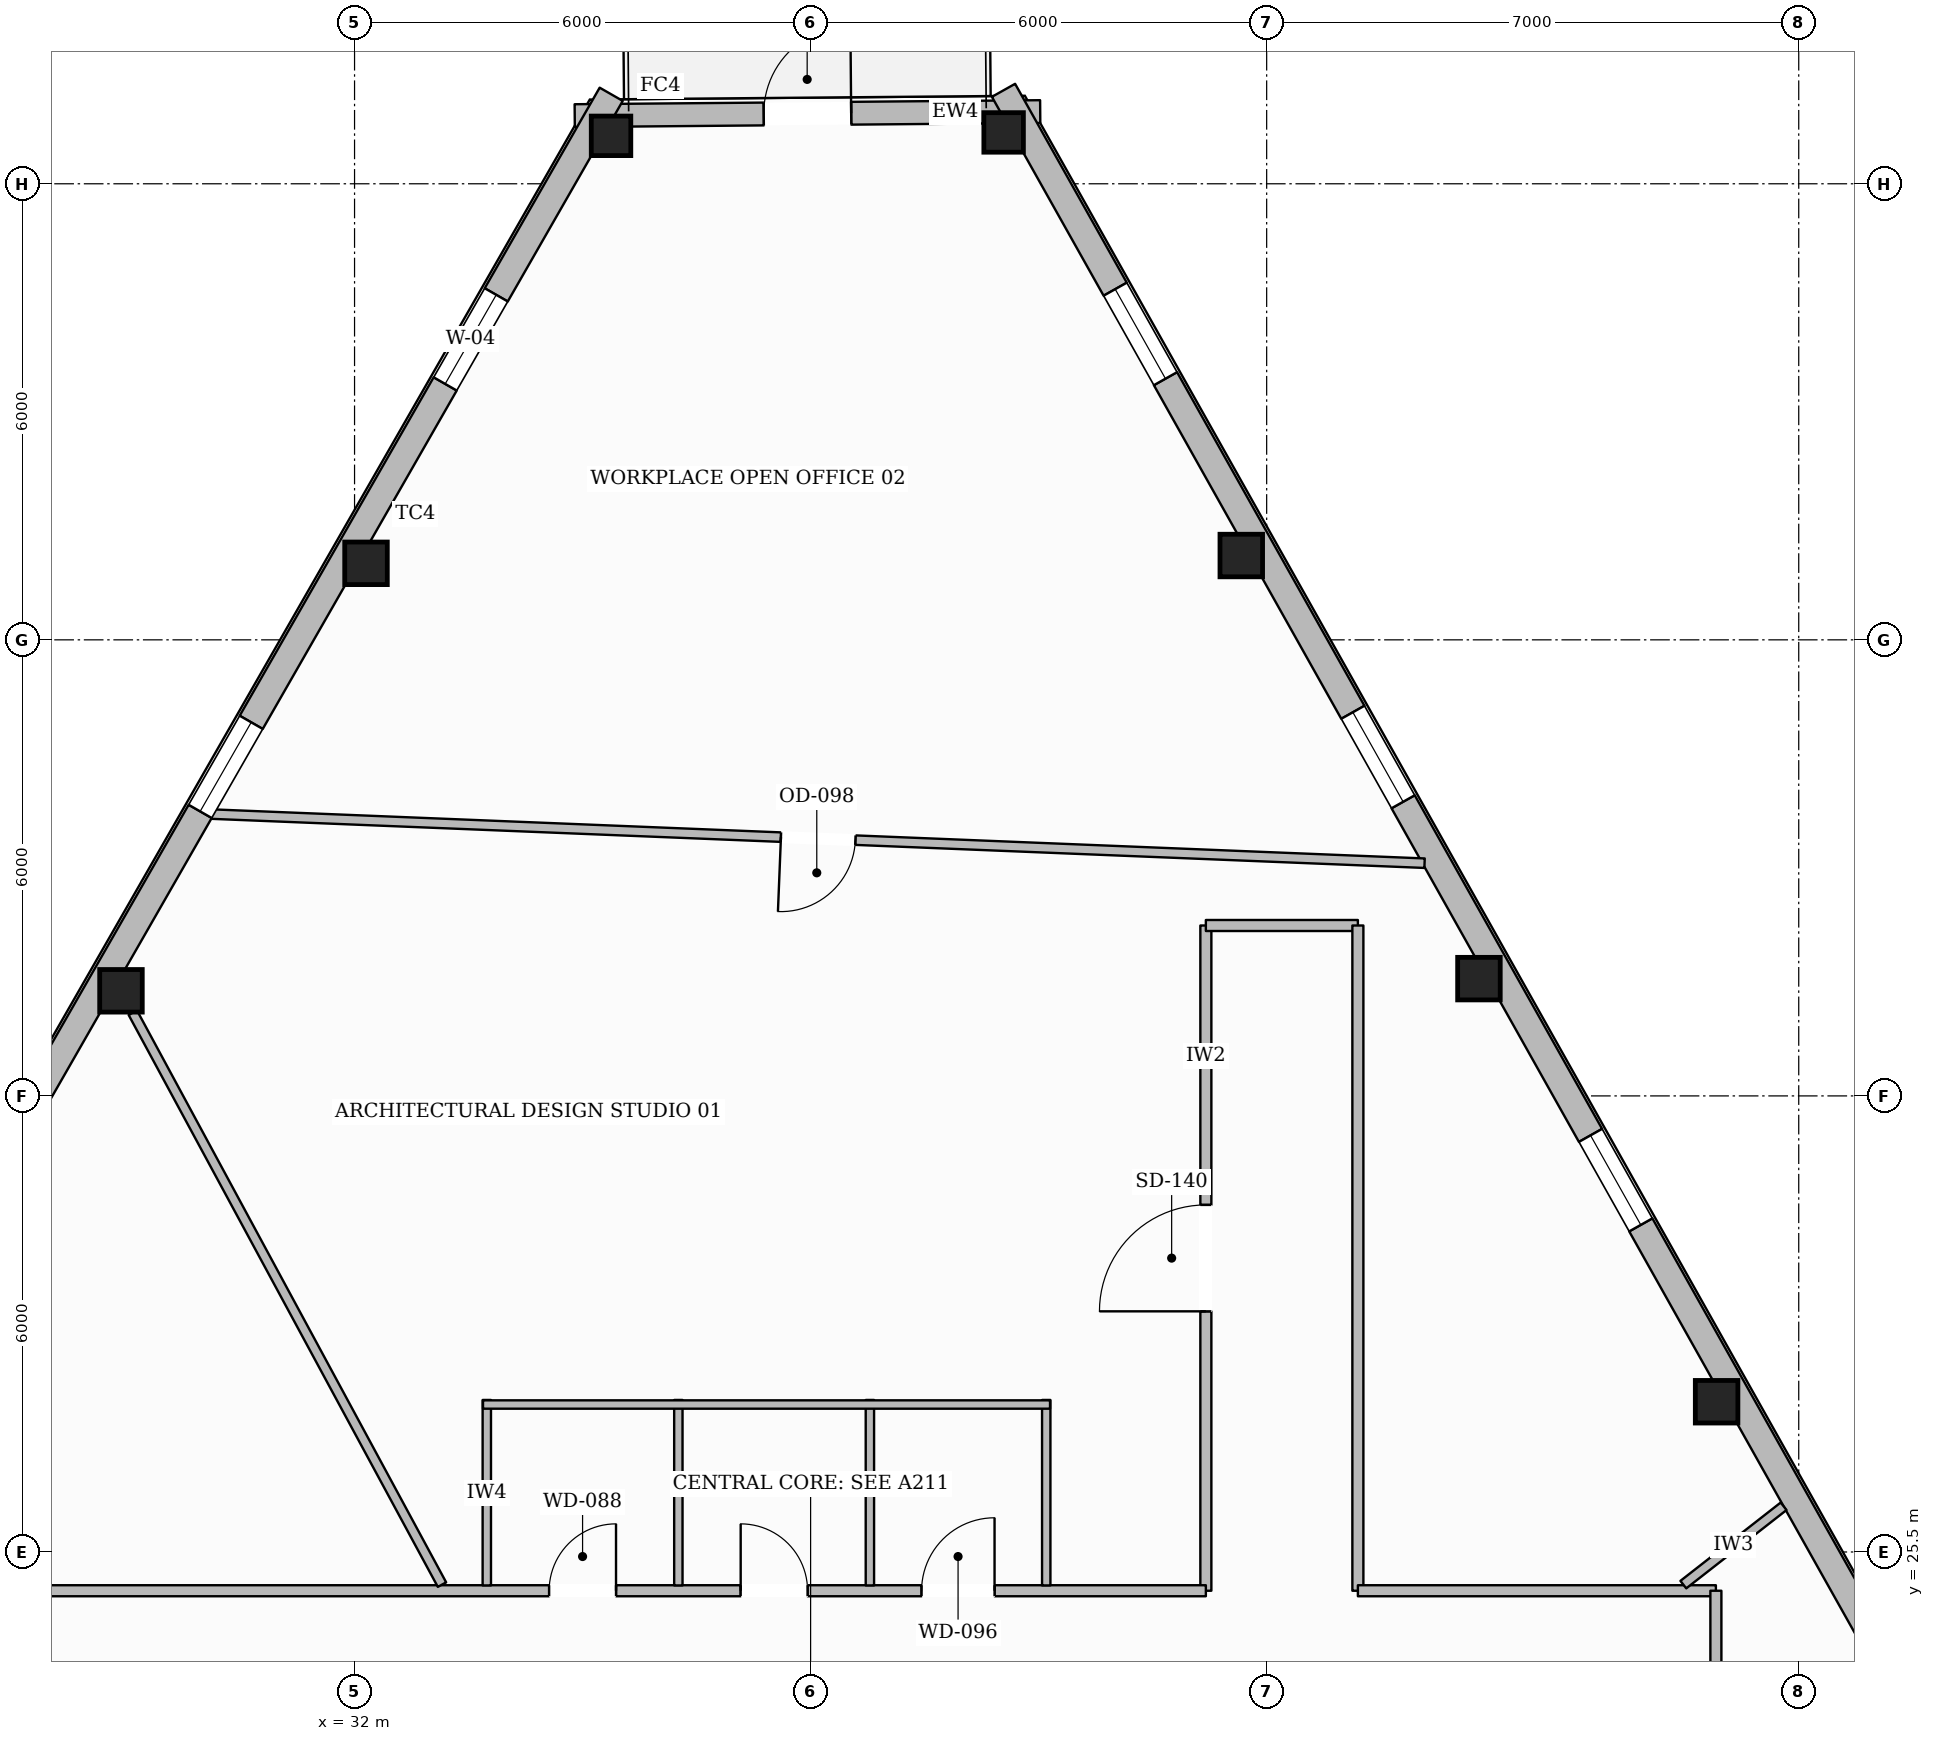
"""IFC4 building model, lengths in metres.
Left out: names, types, materials, properties, quantities, classifications, styles, units other than length and angle.
Written with IfcOpenShell. Run it as: python <this file> out.ifc"""

import sys

from ifc_helpers import new_model, si_unit, direction, frame, frame_2d, origin, origin_2d, place, context, subcontext, project, spatial, rectangle, hollow_rectangle, extrude, element, fill, save


model = new_model("IFC4")
c1 = context("Model", 3, precision=1e-05, world=origin(), true_north=direction((0.0, 1.0)))
c2 = subcontext(c1, "Body", "Model", "MODEL_VIEW")
j1 = project(units=[si_unit("LENGTHUNIT", "METRE"), si_unit("PLANEANGLEUNIT", "RADIAN")], contexts=[c1])
p1 = place(None, origin())
s1 = spatial("IfcSite", under=j1, at=p1, CompositionType="ELEMENT")
p2 = place(p1, origin())
s2 = spatial("IfcBuilding", under=s1, at=p2, CompositionType="ELEMENT")
p3 = place(p2, frame((0.0, 0.0, 297.25)))
s3 = spatial("IfcBuildingStorey", under=s2, at=p3, CompositionType="ELEMENT", Elevation=297.25)
p4 = place(p3, frame((35.375, 44.131, 0.0), z_axis=(0.0, 0.0, 1.0), x_axis=(1.0, 0.0, 0.0)))
e1 = element("IfcColumn", 1, at=p4, inside=s3, PredefinedType="COLUMN", context=c2, shape_type="SweptSolid", body=[
    extrude(hollow_rectangle(XDim=0.52, YDim=0.52, WallThickness=0.024, at=origin_2d()), origin(), (0.0, 0.0, 1.0), 3.61),
])
for number, where, z_axis, x_axis in (
    (2, (32.151, 38.507, 0.0), (0.0, 0.0, 1.0), (1.0, 0.0, 0.0)),
    (3, (28.927, 32.883, 0.0), (0.0, 0.0, 1.0), (1.0, 0.0, 0.0)),
    (4, (49.919, 27.477, 0.0), (0.0, 0.0, 1.0), (1.0, 0.0, 0.0)),
    (5, (46.793, 33.043, 0.0), (0.0, 0.0, 1.0), (1.0, 0.0, 0.0)),
    (6, (43.666, 38.609, 0.0), (0.0, 0.0, 1.0), (1.0, 0.0, 0.0)),
):
    element("IfcColumn", number, at=place(p3, frame(where, z_axis=z_axis, x_axis=x_axis)), inside=s3, PredefinedType="COLUMN", context=c2, shape_type="SweptSolid", body=[
        extrude(hollow_rectangle(XDim=0.56, YDim=0.56, WallThickness=0.025, at=origin_2d()), origin(), (0.0, 0.0, 1.0), 3.61),
    ])
p5 = place(p3, frame((40.539, 44.176, 0.0), z_axis=(0.0, 0.0, 1.0), x_axis=(1.0, 0.0, 0.0)))
e7 = element("IfcColumn", 7, at=p5, inside=s3, PredefinedType="COLUMN", context=c2, shape_type="SweptSolid", body=[
    extrude(hollow_rectangle(XDim=0.52, YDim=0.52, WallThickness=0.024, at=origin_2d()), origin(), (0.0, 0.0, 1.0), 3.61),
])
p6 = place(p3, frame((34.897, 44.396, 0.0), z_axis=(0.0, 0.0, 1.0), x_axis=(0.999962237146, 0.008690470726, 0.0)))
e8 = element("IfcWall", 8, at=p6, inside=s3, PredefinedType="STANDARD", context=c2, shape_type="SweptSolid", body=[
    extrude(rectangle(XDim=6.124, YDim=0.3, at=frame_2d((3.062, 0.0))), origin(), (0.0, 0.0, 1.0), 3.196),
])
p7 = place(p6, frame((2.487, 0.0, 0.0)))
e9 = element("IfcOpeningElement", 9, at=p7, cuts=e8, PredefinedType="OPENING", context=c2, shape_type="SweptSolid", body=[
    extrude(rectangle(XDim=1.15, YDim=2.2, at=frame_2d((0.575, 1.1))), frame((0.0, 0.16, 0.0), z_axis=(0.0, -1.0, 0.0), x_axis=(1.0, 0.0, 0.0)), (0.0, 0.0, 1.0), 0.32),
])
p8 = place(p3, frame((15.563, 10.112, 0.0), z_axis=(0.0, 0.0, 1.0), x_axis=(0.4973006053, 0.867578300771, 0.0)))
e10 = element("IfcWall", 10, at=p8, inside=s3, PredefinedType="STANDARD", context=c2, shape_type="SweptSolid", body=[
    extrude(rectangle(XDim=39.842, YDim=0.35, at=frame_2d((19.921, 0.0))), origin(), (0.0, 0.0, 1.0), 3.196),
])
p9 = place(p8, frame((35.45, 0.0, 0.65)))
e11 = element("IfcOpeningElement", 11, at=p9, cuts=e10, PredefinedType="OPENING", context=c2, shape_type="SweptSolid", body=[
    extrude(rectangle(XDim=1.35, YDim=1.75, at=frame_2d((0.675, 0.875))), frame((0.0, 0.185, 0.0), z_axis=(0.0, -1.0, 0.0), x_axis=(1.0, 0.0, 0.0)), (0.0, 0.0, 1.0), 0.37),
])
p10 = place(p8, frame((28.968, 0.0, 0.65)))
e12 = element("IfcOpeningElement", 12, at=p10, cuts=e10, PredefinedType="OPENING", context=c2, shape_type="SweptSolid", body=[
    extrude(rectangle(XDim=1.35, YDim=1.75, at=frame_2d((0.675, 0.875))), frame((0.0, 0.185, 0.0), z_axis=(0.0, -1.0, 0.0), x_axis=(1.0, 0.0, 0.0)), (0.0, 0.0, 1.0), 0.37),
])
p11 = place(p8, frame((16.003, 0.0, 0.65)))
e13 = element("IfcOpeningElement", 13, at=p11, cuts=e10, PredefinedType="OPENING", context=c2, shape_type="SweptSolid", body=[
    extrude(rectangle(XDim=1.35, YDim=1.75, at=frame_2d((0.675, 0.875))), frame((0.0, 0.185, 0.0), z_axis=(0.0, -1.0, 0.0), x_axis=(1.0, 0.0, 0.0)), (0.0, 0.0, 1.0), 0.37),
])
p12 = place(p8, frame((9.521, 0.0, 0.65)))
e14 = element("IfcOpeningElement", 14, at=p12, cuts=e10, PredefinedType="OPENING", context=c2, shape_type="SweptSolid", body=[
    extrude(rectangle(XDim=1.35, YDim=1.75, at=frame_2d((0.675, 0.875))), frame((0.0, 0.185, 0.0), z_axis=(0.0, -1.0, 0.0), x_axis=(1.0, 0.0, 0.0)), (0.0, 0.0, 1.0), 0.37),
])
p13 = place(p8, frame((3.039, 0.0, 0.65)))
e15 = element("IfcOpeningElement", 15, at=p13, cuts=e10, PredefinedType="OPENING", context=c2, shape_type="SweptSolid", body=[
    extrude(rectangle(XDim=1.35, YDim=1.75, at=frame_2d((0.675, 0.875))), frame((0.0, 0.185, 0.0), z_axis=(0.0, -1.0, 0.0), x_axis=(1.0, 0.0, 0.0)), (0.0, 0.0, 1.0), 0.37),
])
p14 = place(p3, frame((40.538, 44.729, 0.0), z_axis=(0.0, 0.0, 1.0), x_axis=(0.48974037202, -0.871868320341, 0.0)))
e16 = element("IfcWall", 16, at=p14, inside=s3, PredefinedType="STANDARD", context=c2, shape_type="SweptSolid", body=[
    extrude(rectangle(XDim=39.262, YDim=0.35, at=frame_2d((19.631, 0.0))), origin(), (0.0, 0.0, 1.0), 3.196),
])
p15 = place(p14, frame((34.923, 0.0, 0.65)))
e17 = element("IfcOpeningElement", 17, at=p15, cuts=e16, PredefinedType="OPENING", context=c2, shape_type="SweptSolid", body=[
    extrude(rectangle(XDim=1.35, YDim=1.75, at=frame_2d((0.675, 0.875))), frame((0.0, 0.185, 0.0), z_axis=(0.0, -1.0, 0.0), x_axis=(1.0, 0.0, 0.0)), (0.0, 0.0, 1.0), 0.37),
])
p16 = place(p14, frame((28.538, 0.0, 0.65)))
e18 = element("IfcOpeningElement", 18, at=p16, cuts=e16, PredefinedType="OPENING", context=c2, shape_type="SweptSolid", body=[
    extrude(rectangle(XDim=1.35, YDim=1.75, at=frame_2d((0.675, 0.875))), frame((0.0, 0.185, 0.0), z_axis=(0.0, -1.0, 0.0), x_axis=(1.0, 0.0, 0.0)), (0.0, 0.0, 1.0), 0.37),
])
p17 = place(p14, frame((15.77, 0.0, 0.65)))
e19 = element("IfcOpeningElement", 19, at=p17, cuts=e16, PredefinedType="OPENING", context=c2, shape_type="SweptSolid", body=[
    extrude(rectangle(XDim=1.35, YDim=1.75, at=frame_2d((0.675, 0.875))), frame((0.0, 0.185, 0.0), z_axis=(0.0, -1.0, 0.0), x_axis=(1.0, 0.0, 0.0)), (0.0, 0.0, 1.0), 0.37),
])
p18 = place(p14, frame((9.385, 0.0, 0.65)))
e20 = element("IfcOpeningElement", 20, at=p18, cuts=e16, PredefinedType="OPENING", context=c2, shape_type="SweptSolid", body=[
    extrude(rectangle(XDim=1.35, YDim=1.75, at=frame_2d((0.675, 0.875))), frame((0.0, 0.185, 0.0), z_axis=(0.0, -1.0, 0.0), x_axis=(1.0, 0.0, 0.0)), (0.0, 0.0, 1.0), 0.37),
])
p19 = place(p14, frame((3.001, 0.0, 0.65)))
e21 = element("IfcOpeningElement", 21, at=p19, cuts=e16, PredefinedType="OPENING", context=c2, shape_type="SweptSolid", body=[
    extrude(rectangle(XDim=1.35, YDim=1.75, at=frame_2d((0.675, 0.875))), frame((0.0, 0.185, 0.0), z_axis=(0.0, -1.0, 0.0), x_axis=(1.0, 0.0, 0.0)), (0.0, 0.0, 1.0), 0.37),
])
p20 = place(p3, frame((43.2, 24.99, 0.0), z_axis=(0.0, 0.0, 1.0), x_axis=(0.0, 1.0, 0.0)))
e22 = element("IfcWall", 22, at=p20, inside=s3, PredefinedType="PARTITIONING", context=c2, shape_type="SweptSolid", body=[
    extrude(rectangle(XDim=8.752, YDim=0.145, at=frame_2d((4.376, 0.0))), origin(), (0.0, 0.0, 1.0), 3.61),
])
p21 = place(p20, frame((3.676, 0.0, 0.0)))
e23 = element("IfcOpeningElement", 23, at=p21, cuts=e22, PredefinedType="OPENING", context=c2, shape_type="SweptSolid", body=[
    extrude(rectangle(XDim=1.4, YDim=2.2, at=frame_2d((0.7, 1.1))), frame((0.0, 0.083, 0.0), z_axis=(0.0, -1.0, 0.0), x_axis=(1.0, 0.0, 0.0)), (0.0, 0.0, 1.0), 0.165),
])
p22 = place(p3, frame((43.2, 33.742, 0.0), z_axis=(0.0, 0.0, 1.0), x_axis=(1.0, 0.0, 0.0)))
e24 = element("IfcWall", 24, at=p22, inside=s3, PredefinedType="PARTITIONING", context=c2, shape_type="SweptSolid", body=[
    extrude(rectangle(XDim=2.0, YDim=0.145, at=frame_2d((1.0, 0.0))), origin(), (0.0, 0.0, 1.0), 3.61),
])
p23 = place(p3, frame((45.2, 33.742, 0.0), z_axis=(0.0, 0.0, 1.0), x_axis=(0.0, -1.0, 0.0)))
e25 = element("IfcWall", 25, at=p23, inside=s3, PredefinedType="PARTITIONING", context=c2, shape_type="SweptSolid", body=[
    extrude(rectangle(XDim=8.752, YDim=0.145, at=frame_2d((4.376, 0.0))), origin(), (0.0, 0.0, 1.0), 3.61),
])
p24 = place(p3, frame((45.2, 24.99, 0.0), z_axis=(0.0, 0.0, 1.0), x_axis=(1.0, 0.0, 0.0)))
e26 = element("IfcWall", 26, at=p24, inside=s3, PredefinedType="PARTITIONING", context=c2, shape_type="SweptSolid", body=[
    extrude(rectangle(XDim=4.71, YDim=0.145, at=frame_2d((2.355, 0.0))), origin(), (0.0, 0.0, 1.0), 3.61),
])
p25 = place(p3, frame((49.91, 24.99, 0.0), z_axis=(0.0, 0.0, 1.0), x_axis=(0.0, -1.0, 0.0)))
e27 = element("IfcWall", 27, at=p25, inside=s3, PredefinedType="PARTITIONING", context=c2, shape_type="SweptSolid", body=[
    extrude(rectangle(XDim=7.34, YDim=0.145, at=frame_2d((3.67, 0.0))), origin(), (0.0, 0.0, 1.0), 3.349),
])
p26 = place(p3, frame((26.09, 24.99, 0.0), z_axis=(0.0, 0.0, 1.0), x_axis=(1.0, 0.0, 0.0)))
e28 = element("IfcWall", 28, at=p26, inside=s3, PredefinedType="PARTITIONING", context=c2, shape_type="SweptSolid", body=[
    extrude(rectangle(XDim=17.11, YDim=0.145, at=frame_2d((8.555, 0.0))), origin(), (0.0, 0.0, 1.0), 3.61),
])
p27 = place(p26, frame((8.47, 0.0, 0.0)))
e29 = element("IfcOpeningElement", 29, at=p27, cuts=e28, PredefinedType="OPENING", context=c2, shape_type="SweptSolid", body=[
    extrude(rectangle(XDim=0.88, YDim=2.1, at=frame_2d((0.44, 1.05))), frame((0.0, 0.083, 0.0), z_axis=(0.0, -1.0, 0.0), x_axis=(1.0, 0.0, 0.0)), (0.0, 0.0, 1.0), 0.165),
])
p28 = place(p26, frame((10.99, 0.0, 0.0)))
e30 = element("IfcOpeningElement", 30, at=p28, cuts=e28, PredefinedType="OPENING", context=c2, shape_type="SweptSolid", body=[
    extrude(rectangle(XDim=0.88, YDim=2.1, at=frame_2d((0.44, 1.05))), frame((0.0, 0.083, 0.0), z_axis=(0.0, -1.0, 0.0), x_axis=(1.0, 0.0, 0.0)), (0.0, 0.0, 1.0), 0.165),
])
p29 = place(p26, frame((13.37, 0.0, 0.0)))
e31 = element("IfcOpeningElement", 31, at=p29, cuts=e28, PredefinedType="OPENING", context=c2, shape_type="SweptSolid", body=[
    extrude(rectangle(XDim=0.96, YDim=2.1, at=frame_2d((0.48, 1.05))), frame((0.0, 0.083, 0.0), z_axis=(0.0, -1.0, 0.0), x_axis=(1.0, 0.0, 0.0)), (0.0, 0.0, 1.0), 0.165),
])
for number, where, z_axis, x_axis in (
    (32, (33.74, 25.06, 0.0), (0.0, 0.0, 1.0), (0.0, 1.0, 0.0)),
    (33, (36.26, 25.06, 0.0), (0.0, 0.0, 1.0), (0.0, 1.0, 0.0)),
    (34, (38.78, 25.06, 0.0), (0.0, 0.0, 1.0), (0.0, 1.0, 0.0)),
    (35, (41.1, 25.06, 0.0), (0.0, 0.0, 1.0), (0.0, 1.0, 0.0)),
):
    element("IfcWall", number, at=place(p3, frame(where, z_axis=z_axis, x_axis=x_axis)), inside=s3, PredefinedType="PLUMBINGWALL", context=c2, shape_type="SweptSolid", body=[
        extrude(rectangle(XDim=2.44, YDim=0.11, at=frame_2d((1.22, 0.0))), origin(), (0.0, 0.0, 1.0), 3.61),
    ])
p30 = place(p3, frame((33.69, 27.44, 0.0), z_axis=(0.0, 0.0, 1.0), x_axis=(1.0, 0.0, 0.0)))
e36 = element("IfcWall", 36, at=p30, inside=s3, PredefinedType="PLUMBINGWALL", context=c2, shape_type="SweptSolid", body=[
    extrude(rectangle(XDim=7.46, YDim=0.11, at=frame_2d((3.73, 0.0))), origin(), (0.0, 0.0, 1.0), 3.61),
])
p31 = place(p3, frame((49.482, 25.071, 0.0), z_axis=(0.0, 0.0, 1.0), x_axis=(0.788031007274, 0.615635550935, 0.0)))
e37 = element("IfcWall", 37, at=p31, inside=s3, PredefinedType="PARTITIONING", context=c2, shape_type="SweptSolid", body=[
    extrude(rectangle(XDim=1.674, YDim=0.125, at=frame_2d((0.837, 0.0))), origin(), (0.0, 0.0, 1.0), 3.61),
])
p32 = place(p3, frame((33.15, 25.071, 0.0), z_axis=(0.0, 0.0, 1.0), x_axis=(-0.47556300341, 0.879681663892, 0.0)))
e38 = element("IfcWall", 38, at=p32, inside=s3, PredefinedType="PARTITIONING", context=c2, shape_type="SweptSolid", body=[
    extrude(rectangle(XDim=8.553, YDim=0.125, at=frame_2d((4.277, 0.0))), origin(), (0.0, 0.0, 1.0), 3.246),
])
p33 = place(p3, frame((46.077, 34.562, 0.0), z_axis=(0.0, 0.0, 1.0), x_axis=(-0.999181424886, 0.040453432029, 0.0)))
e39 = element("IfcWall", 39, at=p33, inside=s3, PredefinedType="PARTITIONING", context=c2, shape_type="SweptSolid", body=[
    extrude(rectangle(XDim=15.969, YDim=0.125, at=frame_2d((7.984, 0.0))), origin(), (0.0, 0.0, 1.0), 3.61),
])
p34 = place(p33, frame((7.494, 0.0, 0.0)))
e40 = element("IfcOpeningElement", 40, at=p34, cuts=e39, PredefinedType="OPENING", context=c2, shape_type="SweptSolid", body=[
    extrude(rectangle(XDim=0.98, YDim=2.15, at=frame_2d((0.49, 1.075))), frame((0.0, 0.073, 0.0), z_axis=(0.0, -1.0, 0.0), x_axis=(1.0, 0.0, 0.0)), (0.0, 0.0, 1.0), 0.145),
])
p35 = place(p7, origin())
e41 = element("IfcDoor", 41, at=p35, inside=s3, OperationType="SINGLE_SWING_RIGHT", PredefinedType="DOOR", context=c2, shape_type="SweptSolid", body=[
    extrude(rectangle(XDim=1.15, YDim=2.2, at=frame_2d((0.575, 1.1))), frame((0.0, 0.025, 0.0), z_axis=(0.0, -1.0, 0.0), x_axis=(1.0, 0.0, 0.0)), (0.0, 0.0, 1.0), 0.05),
])
fill(e9, e41)
p36 = place(p9, origin())
e42 = element("IfcWindow", 42, at=p36, inside=s3, PartitioningType="SINGLE_PANEL", PredefinedType="WINDOW", context=c2, shape_type="SweptSolid", body=[
    extrude(rectangle(XDim=1.35, YDim=1.75, at=frame_2d((0.675, 0.875))), frame((0.0, 0.03, 0.0), z_axis=(0.0, -1.0, 0.0), x_axis=(1.0, 0.0, 0.0)), (0.0, 0.0, 1.0), 0.06),
])
fill(e11, e42)
p37 = place(p10, origin())
e43 = element("IfcWindow", 43, at=p37, inside=s3, PartitioningType="SINGLE_PANEL", PredefinedType="WINDOW", context=c2, shape_type="SweptSolid", body=[
    extrude(rectangle(XDim=1.35, YDim=1.75, at=frame_2d((0.675, 0.875))), frame((0.0, 0.03, 0.0), z_axis=(0.0, -1.0, 0.0), x_axis=(1.0, 0.0, 0.0)), (0.0, 0.0, 1.0), 0.06),
])
fill(e12, e43)
p38 = place(p17, origin())
e44 = element("IfcWindow", 44, at=p38, inside=s3, PartitioningType="SINGLE_PANEL", PredefinedType="WINDOW", context=c2, shape_type="SweptSolid", body=[
    extrude(rectangle(XDim=1.35, YDim=1.75, at=frame_2d((0.675, 0.875))), frame((0.0, 0.03, 0.0), z_axis=(0.0, -1.0, 0.0), x_axis=(1.0, 0.0, 0.0)), (0.0, 0.0, 1.0), 0.06),
])
fill(e19, e44)
p39 = place(p18, origin())
e45 = element("IfcWindow", 45, at=p39, inside=s3, PartitioningType="SINGLE_PANEL", PredefinedType="WINDOW", context=c2, shape_type="SweptSolid", body=[
    extrude(rectangle(XDim=1.35, YDim=1.75, at=frame_2d((0.675, 0.875))), frame((0.0, 0.03, 0.0), z_axis=(0.0, -1.0, 0.0), x_axis=(1.0, 0.0, 0.0)), (0.0, 0.0, 1.0), 0.06),
])
fill(e20, e45)
p40 = place(p19, origin())
e46 = element("IfcWindow", 46, at=p40, inside=s3, PartitioningType="SINGLE_PANEL", PredefinedType="WINDOW", context=c2, shape_type="SweptSolid", body=[
    extrude(rectangle(XDim=1.35, YDim=1.75, at=frame_2d((0.675, 0.875))), frame((0.0, 0.03, 0.0), z_axis=(0.0, -1.0, 0.0), x_axis=(1.0, 0.0, 0.0)), (0.0, 0.0, 1.0), 0.06),
])
fill(e21, e46)
p41 = place(p27, origin())
e47 = element("IfcDoor", 47, at=p41, inside=s3, OperationType="SINGLE_SWING_RIGHT", PredefinedType="DOOR", context=c2, shape_type="SweptSolid", body=[
    extrude(rectangle(XDim=0.88, YDim=2.1, at=frame_2d((0.44, 1.05))), frame((0.0, 0.025, 0.0), z_axis=(0.0, -1.0, 0.0), x_axis=(1.0, 0.0, 0.0)), (0.0, 0.0, 1.0), 0.05),
])
fill(e29, e47)
p42 = place(p28, origin())
e48 = element("IfcDoor", 48, at=p42, inside=s3, OperationType="SINGLE_SWING_LEFT", PredefinedType="DOOR", context=c2, shape_type="SweptSolid", body=[
    extrude(rectangle(XDim=0.88, YDim=2.1, at=frame_2d((0.44, 1.05))), frame((0.0, 0.025, 0.0), z_axis=(0.0, -1.0, 0.0), x_axis=(1.0, 0.0, 0.0)), (0.0, 0.0, 1.0), 0.05),
])
fill(e30, e48)
p43 = place(p29, origin())
e49 = element("IfcDoor", 49, at=p43, inside=s3, OperationType="SINGLE_SWING_RIGHT", PredefinedType="DOOR", context=c2, shape_type="SweptSolid", body=[
    extrude(rectangle(XDim=0.96, YDim=2.1, at=frame_2d((0.48, 1.05))), frame((0.0, 0.025, 0.0), z_axis=(0.0, -1.0, 0.0), x_axis=(1.0, 0.0, 0.0)), (0.0, 0.0, 1.0), 0.05),
])
fill(e31, e49)
p44 = place(p21, origin())
e50 = element("IfcDoor", 50, at=p44, inside=s3, OperationType="SINGLE_SWING_LEFT", PredefinedType="DOOR", context=c2, shape_type="SweptSolid", body=[
    extrude(rectangle(XDim=1.4, YDim=2.2, at=frame_2d((0.7, 1.1))), frame((0.0, 0.025, 0.0), z_axis=(0.0, -1.0, 0.0), x_axis=(1.0, 0.0, 0.0)), (0.0, 0.0, 1.0), 0.05),
])
fill(e23, e50)
p45 = place(p34, origin())
e51 = element("IfcDoor", 51, at=p45, inside=s3, OperationType="SINGLE_SWING_RIGHT", PredefinedType="DOOR", context=c2, shape_type="SweptSolid", body=[
    extrude(rectangle(XDim=0.98, YDim=2.15, at=frame_2d((0.49, 1.075))), frame((0.0, 0.025, 0.0), z_axis=(0.0, -1.0, 0.0), x_axis=(1.0, 0.0, 0.0)), (0.0, 0.0, 1.0), 0.05),
])
fill(e40, e51)
save(model, sys.argv[1])
